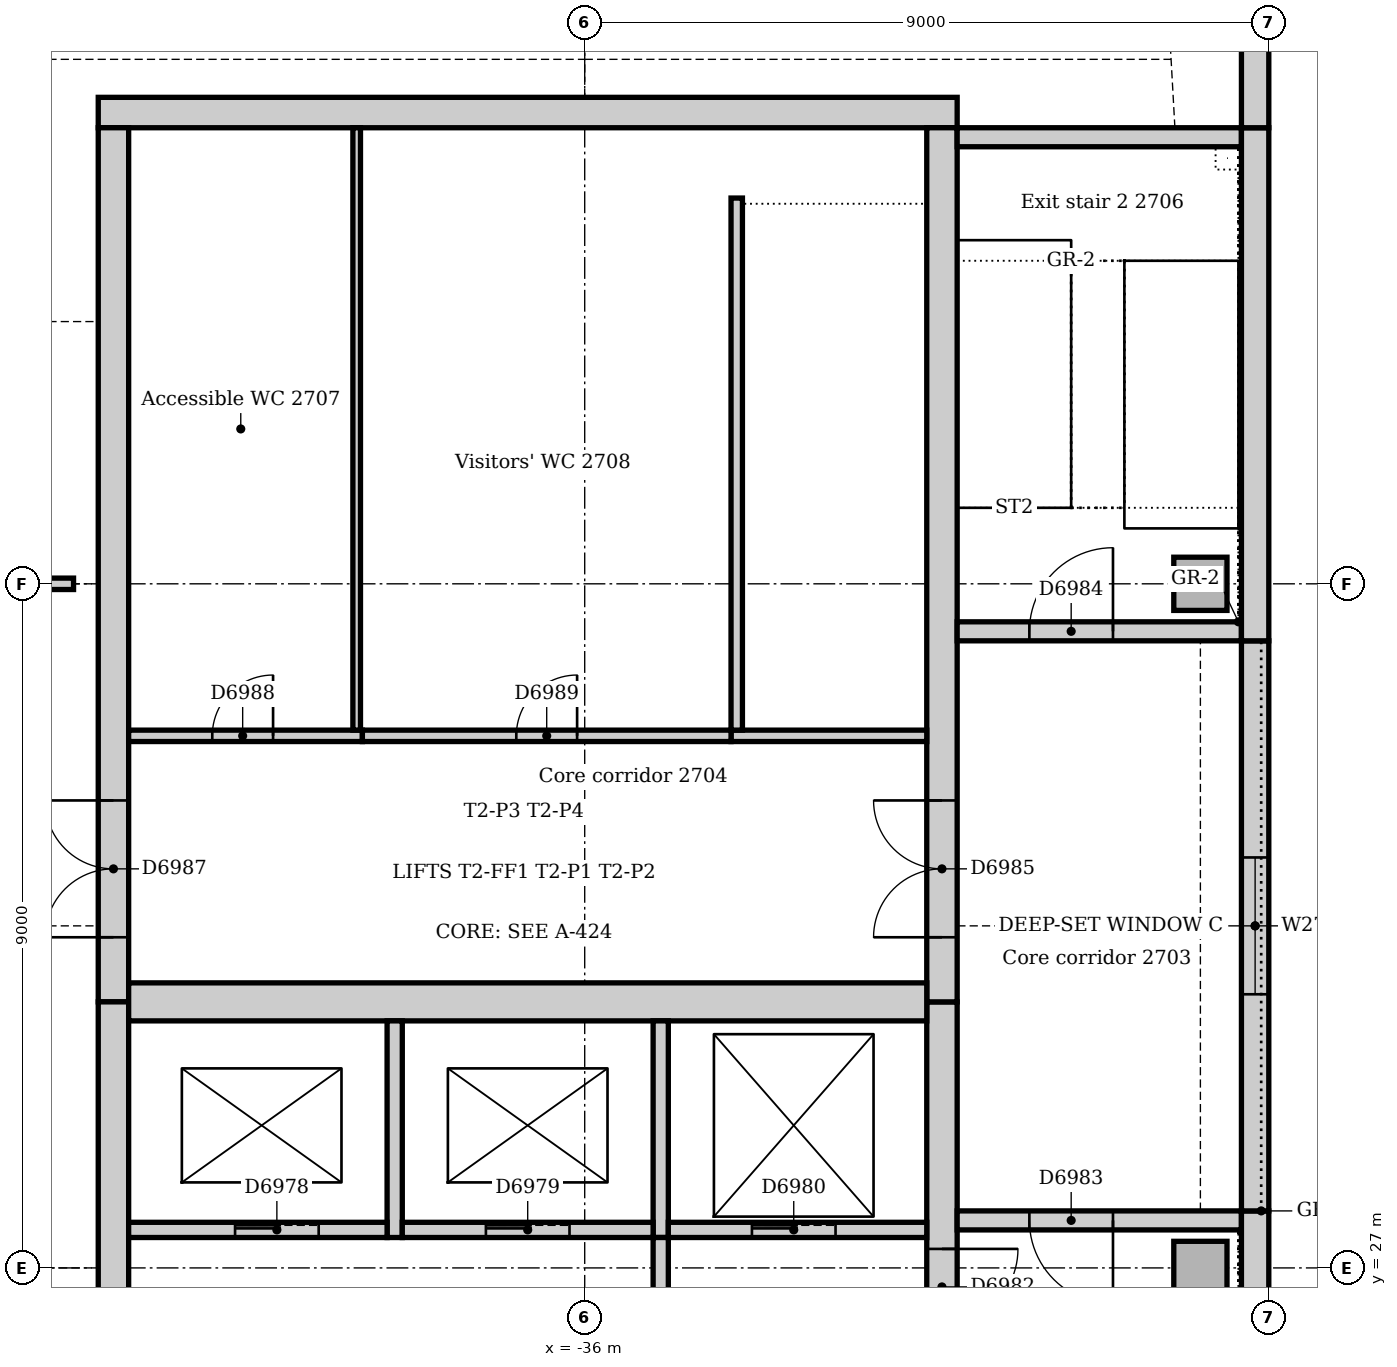
"""IFC4 building model, lengths in metres.
Left out: names, types, materials, properties, quantities, classifications, styles, units other than length and angle.
Written with IfcOpenShell. Run it as: python <this file> out.ifc"""

import sys

from ifc_helpers import new_model, si_unit, direction, frame, frame_2d, origin, origin_2d, place, context, subcontext, project, spatial, rectangle, extrude, element, fill, save


model = new_model("IFC4")
c1 = context("Model", 3, precision=1e-05, world=origin(), true_north=direction((0.0, 1.0)))
c2 = subcontext(c1, "Body", "Model", "MODEL_VIEW")
j1 = project(units=[si_unit("LENGTHUNIT", "METRE"), si_unit("PLANEANGLEUNIT", "RADIAN")], contexts=[c1])
p1 = place(None, origin())
s1 = spatial("IfcSite", under=j1, at=p1, CompositionType="ELEMENT")
p2 = place(p1, origin())
s2 = spatial("IfcBuilding", under=s1, at=p2, CompositionType="ELEMENT")
p3 = place(p2, frame((0.0, 0.0, 116.0)))
s3 = spatial("IfcBuildingStorey", under=s2, at=p3, CompositionType="ELEMENT", Elevation=116.0)
p4 = place(p3, frame((-31.1, 42.2, 0.0), z_axis=(0.0, 0.0, 1.0), x_axis=(-1.0, 0.0, 0.0)))
e1 = element("IfcWall", 1, at=p4, inside=s3, PredefinedType="SOLIDWALL", context=c2, shape_type="SweptSolid", body=[
    extrude(rectangle(XDim=11.3, YDim=0.4, at=frame_2d((5.65, 0.0))), origin(), (0.0, 0.0, 1.0), 4.0),
])
p5 = place(p3, frame((-31.3, 21.0, 0.0), z_axis=(0.0, 0.0, 1.0), x_axis=(0.0, 1.0, 0.0)))
e2 = element("IfcWall", 2, at=p5, inside=s3, PredefinedType="SOLIDWALL", context=c2, shape_type="SweptSolid", body=[
    extrude(rectangle(XDim=9.5, YDim=0.4, at=frame_2d((4.75, 0.0))), origin(), (0.0, 0.0, 1.0), 4.0),
])
p6 = place(p5, frame((5.25, 0.0, 0.0)))
e3 = element("IfcOpeningElement", 3, at=p6, cuts=e2, PredefinedType="OPENING", context=c2, shape_type="SweptSolid", body=[
    extrude(rectangle(XDim=1.0, YDim=2.1, at=frame_2d((0.5, 1.05))), frame((0.0, 0.21, 0.0), z_axis=(0.0, -1.0, 0.0), x_axis=(1.0, 0.0, 0.0)), (0.0, 0.0, 1.0), 0.42),
])
p7 = place(p3, frame((-31.3, 30.5, 0.0), z_axis=(0.0, 0.0, 1.0), x_axis=(0.0, 1.0, 0.0)))
e4 = element("IfcWall", 4, at=p7, inside=s3, PredefinedType="SOLIDWALL", context=c2, shape_type="SweptSolid", body=[
    extrude(rectangle(XDim=11.5, YDim=0.4, at=frame_2d((5.75, 0.0))), origin(), (0.0, 0.0, 1.0), 4.0),
])
p8 = place(p7, frame((0.85, 0.0, 0.0)))
e5 = element("IfcOpeningElement", 5, at=p8, cuts=e4, PredefinedType="OPENING", context=c2, shape_type="SweptSolid", body=[
    extrude(rectangle(XDim=1.8, YDim=2.1, at=frame_2d((0.9, 1.05))), frame((0.0, 0.21, 0.0), z_axis=(0.0, -1.0, 0.0), x_axis=(1.0, 0.0, 0.0)), (0.0, 0.0, 1.0), 0.42),
])
p9 = place(p3, frame((-42.2, 42.0, 0.0), z_axis=(0.0, 0.0, 1.0), x_axis=(0.0, -1.0, 0.0)))
e6 = element("IfcWall", 6, at=p9, inside=s3, PredefinedType="SOLIDWALL", context=c2, shape_type="SweptSolid", body=[
    extrude(rectangle(XDim=11.5, YDim=0.4, at=frame_2d((5.75, 0.0))), origin(), (0.0, 0.0, 1.0), 4.0),
])
p10 = place(p9, frame((8.85, 0.0, 0.0)))
e7 = element("IfcOpeningElement", 7, at=p10, cuts=e6, PredefinedType="OPENING", context=c2, shape_type="SweptSolid", body=[
    extrude(rectangle(XDim=1.8, YDim=2.1, at=frame_2d((0.9, 1.05))), frame((0.0, 0.21, 0.0), z_axis=(0.0, -1.0, 0.0), x_axis=(1.0, 0.0, 0.0)), (0.0, 0.0, 1.0), 0.42),
])
p11 = place(p3, frame((-42.2, 30.5, 0.0), z_axis=(0.0, 0.0, 1.0), x_axis=(0.0, -1.0, 0.0)))
e8 = element("IfcWall", 8, at=p11, inside=s3, PredefinedType="SOLIDWALL", context=c2, shape_type="SweptSolid", body=[
    extrude(rectangle(XDim=9.5, YDim=0.4, at=frame_2d((4.75, 0.0))), origin(), (0.0, 0.0, 1.0), 4.0),
])
p12 = place(p11, frame((3.85, 0.0, 0.0)))
e9 = element("IfcOpeningElement", 9, at=p12, cuts=e8, PredefinedType="OPENING", context=c2, shape_type="SweptSolid", body=[
    extrude(rectangle(XDim=1.8, YDim=2.1, at=frame_2d((0.9, 1.05))), frame((0.0, 0.21, 0.0), z_axis=(0.0, -1.0, 0.0), x_axis=(1.0, 0.0, 0.0)), (0.0, 0.0, 1.0), 0.42),
])
p13 = place(p3, frame((-42.0, 30.5, 0.0), z_axis=(0.0, 0.0, 1.0), x_axis=(1.0, 0.0, 0.0)))
e10 = element("IfcWall", 10, at=p13, inside=s3, PredefinedType="SOLIDWALL", context=c2, shape_type="SweptSolid", body=[
    extrude(rectangle(XDim=10.5, YDim=0.5, at=frame_2d((5.25, 0.0))), origin(), (0.0, 0.0, 1.0), 4.0),
])
p14 = place(p3, frame((-27.36, 27.625, 0.0), z_axis=(0.0, 0.0, 1.0), x_axis=(-1.0, 0.0, 0.0)))
e11 = element("IfcWall", 11, at=p14, inside=s3, PredefinedType="SOLIDWALL", context=c2, shape_type="SweptSolid", body=[
    extrude(rectangle(XDim=3.74, YDim=0.25, at=frame_2d((1.87, 0.0))), origin(), (0.0, 0.0, 1.0), 4.0),
])
p15 = place(p14, frame((1.69, 0.0, 0.0)))
e12 = element("IfcOpeningElement", 12, at=p15, cuts=e11, PredefinedType="OPENING", context=c2, shape_type="SweptSolid", body=[
    extrude(rectangle(XDim=1.1, YDim=2.1, at=frame_2d((0.55, 1.05))), frame((0.0, 0.135, 0.0), z_axis=(0.0, -1.0, 0.0), x_axis=(1.0, 0.0, 0.0)), (0.0, 0.0, 1.0), 0.27),
])
p16 = place(p3, frame((-31.1, 35.375, 0.0), z_axis=(0.0, 0.0, 1.0), x_axis=(1.0, 0.0, 0.0)))
e13 = element("IfcWall", 13, at=p16, inside=s3, PredefinedType="SOLIDWALL", context=c2, shape_type="SweptSolid", body=[
    extrude(rectangle(XDim=3.74, YDim=0.25, at=frame_2d((1.87, 0.0))), origin(), (0.0, 0.0, 1.0), 4.0),
])
p17 = place(p16, frame((0.95, 0.0, 0.0)))
e14 = element("IfcOpeningElement", 14, at=p17, cuts=e13, PredefinedType="OPENING", context=c2, shape_type="SweptSolid", body=[
    extrude(rectangle(XDim=1.1, YDim=2.1, at=frame_2d((0.55, 1.05))), frame((0.0, 0.135, 0.0), z_axis=(0.0, -1.0, 0.0), x_axis=(1.0, 0.0, 0.0)), (0.0, 0.0, 1.0), 0.27),
])
p18 = place(p3, frame((-27.36, 41.875, 0.0), z_axis=(0.0, 0.0, 1.0), x_axis=(-1.0, 0.0, 0.0)))
e15 = element("IfcWall", 15, at=p18, inside=s3, PredefinedType="SOLIDWALL", context=c2, shape_type="SweptSolid", body=[
    extrude(rectangle(XDim=3.74, YDim=0.25, at=frame_2d((1.87, 0.0))), origin(), (0.0, 0.0, 1.0), 4.0),
])
for number, where, z_axis, x_axis in (
    (16, (-27.9, 27.0, 0.0), (0.0, 0.0, 1.0), (1.0, 0.0, 0.0)),
    (17, (-27.9, 36.0, 0.0), (0.0, 0.0, 1.0), (1.0, 0.0, 0.0)),
):
    element("IfcColumn", number, at=place(p3, frame(where, z_axis=z_axis, x_axis=x_axis)), inside=s3, PredefinedType="COLUMN", context=c2, shape_type="SweptSolid", body=[
        extrude(rectangle(XDim=0.7, YDim=0.7, at=origin_2d()), origin(), (0.0, 0.0, 1.0), 4.0),
    ])
p19 = place(p3, frame((-27.18, 21.0, 0.0), z_axis=(0.0, 0.0, 1.0), x_axis=(0.0, 1.0, 0.0)))
e18 = element("IfcWall", 18, at=p19, inside=s3, PredefinedType="STANDARD", context=c2, shape_type="SweptSolid", body=[
    extrude(rectangle(XDim=6.75, YDim=0.36, at=frame_2d((3.375, 0.0))), origin(), (0.0, 0.0, 1.0), 3.85),
])
p20 = place(p3, frame((-27.18, 27.75, 0.0), z_axis=(0.0, 0.0, 1.0), x_axis=(0.0, 1.0, 0.0)))
e19 = element("IfcWall", 19, at=p20, inside=s3, PredefinedType="STANDARD", context=c2, shape_type="SweptSolid", body=[
    extrude(rectangle(XDim=7.5, YDim=0.36, at=frame_2d((3.75, 0.0))), origin(), (0.0, 0.0, 1.0), 3.85),
])
p21 = place(p20, frame((2.85, 0.0, 1.2)))
e20 = element("IfcOpeningElement", 20, at=p21, cuts=e19, PredefinedType="OPENING", context=c2, shape_type="SweptSolid", body=[
    extrude(rectangle(XDim=1.8, YDim=1.2, at=frame_2d((0.9, 0.6))), frame((0.0, 0.19, 0.0), z_axis=(0.0, -1.0, 0.0), x_axis=(1.0, 0.0, 0.0)), (0.0, 0.0, 1.0), 0.38),
])
p22 = place(p3, frame((-27.18, 35.25, 0.0), z_axis=(0.0, 0.0, 1.0), x_axis=(0.0, 1.0, 0.0)))
e21 = element("IfcWall", 21, at=p22, inside=s3, PredefinedType="STANDARD", context=c2, shape_type="SweptSolid", body=[
    extrude(rectangle(XDim=6.75, YDim=0.36, at=frame_2d((3.375, 0.0))), origin(), (0.0, 0.0, 1.0), 3.85),
])
p23 = place(p3, frame((-27.18, 42.0, 0.0), z_axis=(0.0, 0.0, 1.0), x_axis=(0.0, 1.0, 0.0)))
e22 = element("IfcWall", 22, at=p23, inside=s3, PredefinedType="STANDARD", context=c2, shape_type="SweptSolid", body=[
    extrude(rectangle(XDim=3.257, YDim=0.36, at=frame_2d((1.629, 0.0))), origin(), (0.0, 0.0, 1.0), 3.85),
])
p24 = place(p3, frame((-38.5, 27.4, 0.0), z_axis=(0.0, 0.0, 1.0), x_axis=(0.0, 1.0, 0.0)))
e23 = element("IfcWall", 23, at=p24, inside=s3, PredefinedType="SOLIDWALL", context=c2, shape_type="SweptSolid", body=[
    extrude(rectangle(XDim=2.85, YDim=0.2, at=frame_2d((1.425, 0.0))), origin(), (0.0, 0.0, 1.0), 4.0),
])
p25 = place(p3, frame((-42.0, 27.5, 0.0), z_axis=(0.0, 0.0, 1.0), x_axis=(1.0, 0.0, 0.0)))
e24 = element("IfcWall", 24, at=p25, inside=s3, PredefinedType="SOLIDWALL", context=c2, shape_type="SweptSolid", body=[
    extrude(rectangle(XDim=3.4, YDim=0.2, at=frame_2d((1.7, 0.0))), origin(), (0.0, 0.0, 1.0), 4.0),
])
p26 = place(p25, frame((1.4, 0.0, 0.0)))
e25 = element("IfcOpeningElement", 25, at=p26, cuts=e24, PredefinedType="OPENING", context=c2, shape_type="SweptSolid", body=[
    extrude(rectangle(XDim=1.1, YDim=2.1, at=frame_2d((0.55, 1.05))), frame((0.0, 0.11, 0.0), z_axis=(0.0, -1.0, 0.0), x_axis=(1.0, 0.0, 0.0)), (0.0, 0.0, 1.0), 0.22),
])
p27 = place(p3, frame((-35.0, 27.4, 0.0), z_axis=(0.0, 0.0, 1.0), x_axis=(0.0, 1.0, 0.0)))
e26 = element("IfcWall", 26, at=p27, inside=s3, PredefinedType="SOLIDWALL", context=c2, shape_type="SweptSolid", body=[
    extrude(rectangle(XDim=2.85, YDim=0.2, at=frame_2d((1.425, 0.0))), origin(), (0.0, 0.0, 1.0), 4.0),
])
p28 = place(p3, frame((-38.4, 27.5, 0.0), z_axis=(0.0, 0.0, 1.0), x_axis=(1.0, 0.0, 0.0)))
e27 = element("IfcWall", 27, at=p28, inside=s3, PredefinedType="SOLIDWALL", context=c2, shape_type="SweptSolid", body=[
    extrude(rectangle(XDim=3.3, YDim=0.2, at=frame_2d((1.65, 0.0))), origin(), (0.0, 0.0, 1.0), 4.0),
])
p29 = place(p28, frame((1.1, 0.0, 0.0)))
e28 = element("IfcOpeningElement", 28, at=p29, cuts=e27, PredefinedType="OPENING", context=c2, shape_type="SweptSolid", body=[
    extrude(rectangle(XDim=1.1, YDim=2.1, at=frame_2d((0.55, 1.05))), frame((0.0, 0.11, 0.0), z_axis=(0.0, -1.0, 0.0), x_axis=(1.0, 0.0, 0.0)), (0.0, 0.0, 1.0), 0.22),
])
p30 = place(p3, frame((-34.9, 27.5, 0.0), z_axis=(0.0, 0.0, 1.0), x_axis=(1.0, 0.0, 0.0)))
e29 = element("IfcWall", 29, at=p30, inside=s3, PredefinedType="SOLIDWALL", context=c2, shape_type="SweptSolid", body=[
    extrude(rectangle(XDim=3.4, YDim=0.2, at=frame_2d((1.7, 0.0))), origin(), (0.0, 0.0, 1.0), 4.0),
])
p31 = place(p30, frame((1.1, 0.0, 0.0)))
e30 = element("IfcOpeningElement", 30, at=p31, cuts=e29, PredefinedType="OPENING", context=c2, shape_type="SweptSolid", body=[
    extrude(rectangle(XDim=1.1, YDim=2.1, at=frame_2d((0.55, 1.05))), frame((0.0, 0.11, 0.0), z_axis=(0.0, -1.0, 0.0), x_axis=(1.0, 0.0, 0.0)), (0.0, 0.0, 1.0), 0.22),
])
p32 = place(p3, frame((-35.0, 24.1, 0.0), z_axis=(0.0, 0.0, 1.0), x_axis=(0.0, 1.0, 0.0)))
e31 = element("IfcWall", 31, at=p32, inside=s3, PredefinedType="SOLIDWALL", context=c2, shape_type="SweptSolid", body=[
    extrude(rectangle(XDim=3.3, YDim=0.2, at=frame_2d((1.65, 0.0))), origin(), (0.0, 0.0, 1.0), 4.0),
])
p33 = place(p32, frame((1.15, 0.0, 0.0)))
e32 = element("IfcOpeningElement", 32, at=p33, cuts=e31, PredefinedType="OPENING", context=c2, shape_type="SweptSolid", body=[
    extrude(rectangle(XDim=1.0, YDim=2.1, at=frame_2d((0.5, 1.05))), frame((0.0, 0.11, 0.0), z_axis=(0.0, -1.0, 0.0), x_axis=(1.0, 0.0, 0.0)), (0.0, 0.0, 1.0), 0.22),
])
p34 = place(p3, frame((-34.075, 34.0, 0.0), z_axis=(0.0, 0.0, 1.0), x_axis=(1.0, 0.0, 0.0)))
e33 = element("IfcWall", 33, at=p34, inside=s3, PredefinedType="SOLIDWALL", context=c2, shape_type="SweptSolid", body=[
    extrude(rectangle(XDim=2.575, YDim=0.15, at=frame_2d((1.288, 0.0))), origin(), (0.0, 0.0, 1.0), 4.0),
])
p35 = place(p3, frame((-34.0, 41.075, 0.0), z_axis=(0.0, 0.0, 1.0), x_axis=(0.0, -1.0, 0.0)))
e34 = element("IfcWall", 34, at=p35, inside=s3, PredefinedType="SOLIDWALL", context=c2, shape_type="SweptSolid", body=[
    extrude(rectangle(XDim=7.0, YDim=0.15, at=frame_2d((3.5, 0.0))), origin(), (0.0, 0.0, 1.0), 4.0),
])
p36 = place(p3, frame((-38.925, 34.0, 0.0), z_axis=(0.0, 0.0, 1.0), x_axis=(-1.0, 0.0, 0.0)))
e35 = element("IfcWall", 35, at=p36, inside=s3, PredefinedType="PARTITIONING", context=c2, shape_type="SweptSolid", body=[
    extrude(rectangle(XDim=3.075, YDim=0.15, at=frame_2d((1.538, 0.0))), origin(), (0.0, 0.0, 1.0), 3.85),
])
p37 = place(p36, frame((1.175, 0.0, 0.0)))
e36 = element("IfcOpeningElement", 36, at=p37, cuts=e35, PredefinedType="OPENING", context=c2, shape_type="SweptSolid", body=[
    extrude(rectangle(XDim=0.8, YDim=2.1, at=frame_2d((0.4, 1.05))), frame((0.0, 0.085, 0.0), z_axis=(0.0, -1.0, 0.0), x_axis=(1.0, 0.0, 0.0)), (0.0, 0.0, 1.0), 0.17),
])
p38 = place(p3, frame((-34.075, 34.0, 0.0), z_axis=(0.0, 0.0, 1.0), x_axis=(-1.0, 0.0, 0.0)))
e37 = element("IfcWall", 37, at=p38, inside=s3, PredefinedType="PARTITIONING", context=c2, shape_type="SweptSolid", body=[
    extrude(rectangle(XDim=4.85, YDim=0.15, at=frame_2d((2.425, 0.0))), origin(), (0.0, 0.0, 1.0), 3.85),
])
p39 = place(p38, frame((2.025, 0.0, 0.0)))
e38 = element("IfcOpeningElement", 38, at=p39, cuts=e37, PredefinedType="OPENING", context=c2, shape_type="SweptSolid", body=[
    extrude(rectangle(XDim=0.8, YDim=2.1, at=frame_2d((0.4, 1.05))), frame((0.0, 0.085, 0.0), z_axis=(0.0, -1.0, 0.0), x_axis=(1.0, 0.0, 0.0)), (0.0, 0.0, 1.0), 0.17),
])
p40 = place(p3, frame((-39.0, 34.075, 0.0), z_axis=(0.0, 0.0, 1.0), x_axis=(0.0, 1.0, 0.0)))
e39 = element("IfcWall", 39, at=p40, inside=s3, PredefinedType="PARTITIONING", context=c2, shape_type="SweptSolid", body=[
    extrude(rectangle(XDim=7.925, YDim=0.1, at=frame_2d((3.962, 0.0))), origin(), (0.0, 0.0, 1.0), 3.85),
])
p41 = place(p3, frame((-44.7, 36.0, 0.0), z_axis=(0.0, 0.0, 1.0), x_axis=(1.0, 0.0, 0.0)))
e40 = element("IfcWall", 40, at=p41, inside=s3, PredefinedType="PARTITIONING", context=c2, shape_type="SweptSolid", body=[
    extrude(rectangle(XDim=1.975, YDim=0.15, at=frame_2d((0.988, 0.0))), origin(), (0.0, 0.0, 1.0), 3.602),
])
p42 = place(p41, frame((0.55, 0.0, 0.0)))
e41 = element("IfcOpeningElement", 41, at=p42, cuts=e40, PredefinedType="OPENING", context=c2, shape_type="SweptSolid", body=[
    extrude(rectangle(XDim=0.9, YDim=2.1, at=frame_2d((0.45, 1.05))), frame((0.0, 0.085, 0.0), z_axis=(0.0, -1.0, 0.0), x_axis=(1.0, 0.0, 0.0)), (0.0, 0.0, 1.0), 0.17),
])
p43 = place(p21, origin())
e42 = element("IfcWindow", 42, at=p43, inside=s3, PartitioningType="SINGLE_PANEL", PredefinedType="WINDOW", context=c2, shape_type="SweptSolid", body=[
    extrude(rectangle(XDim=1.8, YDim=1.2, at=frame_2d((0.9, 0.6))), frame((0.0, 0.13, 0.0), z_axis=(0.0, -1.0, 0.0), x_axis=(1.0, 0.0, 0.0)), (0.0, 0.0, 1.0), 0.06),
])
fill(e20, e42)
p44 = place(p26, origin())
e43 = element("IfcDoor", 43, at=p44, inside=s3, OperationType="SLIDING_TO_LEFT", PredefinedType="DOOR", context=c2, shape_type="SweptSolid", body=[
    extrude(rectangle(XDim=1.1, YDim=2.1, at=frame_2d((0.55, 1.05))), frame((0.0, 0.025, 0.0), z_axis=(0.0, -1.0, 0.0), x_axis=(1.0, 0.0, 0.0)), (0.0, 0.0, 1.0), 0.05),
])
fill(e25, e43)
p45 = place(p29, origin())
e44 = element("IfcDoor", 44, at=p45, inside=s3, OperationType="SLIDING_TO_LEFT", PredefinedType="DOOR", context=c2, shape_type="SweptSolid", body=[
    extrude(rectangle(XDim=1.1, YDim=2.1, at=frame_2d((0.55, 1.05))), frame((0.0, 0.025, 0.0), z_axis=(0.0, -1.0, 0.0), x_axis=(1.0, 0.0, 0.0)), (0.0, 0.0, 1.0), 0.05),
])
fill(e28, e44)
p46 = place(p31, origin())
e45 = element("IfcDoor", 45, at=p46, inside=s3, OperationType="SLIDING_TO_LEFT", PredefinedType="DOOR", context=c2, shape_type="SweptSolid", body=[
    extrude(rectangle(XDim=1.1, YDim=2.1, at=frame_2d((0.55, 1.05))), frame((0.0, 0.025, 0.0), z_axis=(0.0, -1.0, 0.0), x_axis=(1.0, 0.0, 0.0)), (0.0, 0.0, 1.0), 0.05),
])
fill(e30, e45)
p47 = place(p6, frame((1.0, 0.0, 0.0), z_axis=(0.0, 0.0, 1.0), x_axis=(-1.0, 0.0, 0.0)))
e46 = element("IfcDoor", 46, at=p47, inside=s3, OperationType="SINGLE_SWING_LEFT", PredefinedType="DOOR", context=c2, shape_type="SweptSolid", body=[
    extrude(rectangle(XDim=1.0, YDim=2.1, at=frame_2d((0.5, 1.05))), frame((0.0, 0.025, 0.0), z_axis=(0.0, -1.0, 0.0), x_axis=(1.0, 0.0, 0.0)), (0.0, 0.0, 1.0), 0.05),
])
fill(e3, e46)
p48 = place(p15, origin())
e47 = element("IfcDoor", 47, at=p48, inside=s3, OperationType="SINGLE_SWING_LEFT", PredefinedType="DOOR", context=c2, shape_type="SweptSolid", body=[
    extrude(rectangle(XDim=1.1, YDim=2.1, at=frame_2d((0.55, 1.05))), frame((0.0, 0.025, 0.0), z_axis=(0.0, -1.0, 0.0), x_axis=(1.0, 0.0, 0.0)), (0.0, 0.0, 1.0), 0.05),
])
fill(e12, e47)
p49 = place(p17, origin())
e48 = element("IfcDoor", 48, at=p49, inside=s3, OperationType="SINGLE_SWING_RIGHT", PredefinedType="DOOR", context=c2, shape_type="SweptSolid", body=[
    extrude(rectangle(XDim=1.1, YDim=2.1, at=frame_2d((0.55, 1.05))), frame((0.0, 0.025, 0.0), z_axis=(0.0, -1.0, 0.0), x_axis=(1.0, 0.0, 0.0)), (0.0, 0.0, 1.0), 0.05),
])
fill(e14, e48)
p50 = place(p8, origin())
e49 = element("IfcDoor", 49, at=p50, inside=s3, OperationType="DOUBLE_DOOR_SINGLE_SWING", PredefinedType="DOOR", context=c2, shape_type="SweptSolid", body=[
    extrude(rectangle(XDim=1.8, YDim=2.1, at=frame_2d((0.9, 1.05))), frame((0.0, 0.025, 0.0), z_axis=(0.0, -1.0, 0.0), x_axis=(1.0, 0.0, 0.0)), (0.0, 0.0, 1.0), 0.05),
])
fill(e5, e49)
p51 = place(p10, frame((1.8, 0.0, 0.0), z_axis=(0.0, 0.0, 1.0), x_axis=(-1.0, 0.0, 0.0)))
e50 = element("IfcDoor", 50, at=p51, inside=s3, OperationType="DOUBLE_DOOR_SINGLE_SWING", PredefinedType="DOOR", context=c2, shape_type="SweptSolid", body=[
    extrude(rectangle(XDim=1.8, YDim=2.1, at=frame_2d((0.9, 1.05))), frame((0.0, 0.025, 0.0), z_axis=(0.0, -1.0, 0.0), x_axis=(1.0, 0.0, 0.0)), (0.0, 0.0, 1.0), 0.05),
])
fill(e7, e50)
p52 = place(p37, frame((0.8, 0.0, 0.0), z_axis=(0.0, 0.0, 1.0), x_axis=(-1.0, 0.0, 0.0)))
e51 = element("IfcDoor", 51, at=p52, inside=s3, OperationType="SINGLE_SWING_RIGHT", PredefinedType="DOOR", context=c2, shape_type="SweptSolid", body=[
    extrude(rectangle(XDim=0.8, YDim=2.1, at=frame_2d((0.4, 1.05))), frame((0.0, 0.025, 0.0), z_axis=(0.0, -1.0, 0.0), x_axis=(1.0, 0.0, 0.0)), (0.0, 0.0, 1.0), 0.05),
])
fill(e36, e51)
p53 = place(p39, frame((0.8, 0.0, 0.0), z_axis=(0.0, 0.0, 1.0), x_axis=(-1.0, 0.0, 0.0)))
e52 = element("IfcDoor", 52, at=p53, inside=s3, OperationType="SINGLE_SWING_RIGHT", PredefinedType="DOOR", context=c2, shape_type="SweptSolid", body=[
    extrude(rectangle(XDim=0.8, YDim=2.1, at=frame_2d((0.4, 1.05))), frame((0.0, 0.025, 0.0), z_axis=(0.0, -1.0, 0.0), x_axis=(1.0, 0.0, 0.0)), (0.0, 0.0, 1.0), 0.05),
])
fill(e38, e52)
save(model, sys.argv[1])
